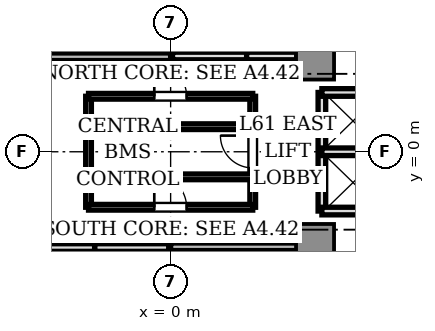
"""IFC4 building model, lengths in metres.
Left out: names, types, materials, properties, quantities, classifications, styles, units other than length and angle.
Written with IfcOpenShell. Run it as: python <this file> out.ifc"""

import sys

from ifc_helpers import new_model, si_unit, direction, frame, frame_2d, origin, origin_2d, place, context, subcontext, project, spatial, rectangle, extrude, source, transform, mapped, element, fill, save


model = new_model("IFC4")
c1 = context("Model", 3, precision=1e-05, world=origin(), true_north=direction((0.0, 1.0)))
c2 = subcontext(c1, "Body", "Model", "MODEL_VIEW")
j1 = project(units=[si_unit("LENGTHUNIT", "METRE"), si_unit("PLANEANGLEUNIT", "RADIAN")], contexts=[c1])
p1 = place(None, origin())
s1 = spatial("IfcSite", under=j1, at=p1, CompositionType="ELEMENT")
p2 = place(p1, origin())
s2 = spatial("IfcBuilding", under=s1, at=p2, CompositionType="ELEMENT")
p3 = place(p2, frame((0.0, 0.0, 219.9)))
s3 = spatial("IfcBuildingStorey", under=s2, at=p3, CompositionType="ELEMENT", Elevation=219.9)
m1 = source(origin(), c2, "Body", "SweptSolid", [
    extrude(rectangle(XDim=1.0, YDim=1.0, at=origin_2d()), origin(), (0.0, 0.0, 1.0), 3.11),
])
for number, where, z_axis, x_axis in (
    (1, (3.8, 2.4, 0.0), (0.0, 0.0, 1.0), (1.0, 0.0, 0.0)),
    (2, (3.8, -2.4, 0.0), (0.0, 0.0, 1.0), (1.0, 0.0, 0.0)),
):
    element("IfcColumn", number, at=place(p3, frame(where, z_axis=z_axis, x_axis=x_axis)), inside=s3, PredefinedType="COLUMN", context=c2, shape_type="MappedRepresentation", body=[
        mapped(m1, transform((0.0, 0.0, 0.0), scale=1.0)),
    ])
p4 = place(p3, frame((0.0, 2.5, 0.0), z_axis=(0.0, 0.0, 1.0), x_axis=(0.0, 1.0, 0.0)))
e3 = element("IfcWall", 3, at=p4, inside=s3, PredefinedType="SOLIDWALL", context=c2, shape_type="SweptSolid", body=[
    extrude(rectangle(XDim=7.68, YDim=0.2, at=frame_2d((3.84, 0.0))), origin(), (0.0, 0.0, 1.0), 3.11),
])
p5 = place(p4, frame((6.36, 0.0, 0.0)))
e4 = element("IfcOpeningElement", 4, at=p5, cuts=e3, PredefinedType="OPENING", context=c2, shape_type="SweptSolid", body=[
    extrude(rectangle(XDim=1.1, YDim=2.15, at=frame_2d((0.55, 1.075))), frame((0.0, 0.11, 0.0), z_axis=(0.0, -1.0, 0.0), x_axis=(1.0, 0.0, 0.0)), (0.0, 0.0, 1.0), 0.22),
])
p6 = place(p3, frame((-3.72, 2.5, 0.0), z_axis=(0.0, 0.0, 1.0), x_axis=(1.0, 0.0, 0.0)))
e5 = element("IfcWall", 5, at=p6, inside=s3, PredefinedType="SOLIDWALL", context=c2, shape_type="SweptSolid", body=[
    extrude(rectangle(XDim=3.72, YDim=0.2, at=frame_2d((1.86, 0.0))), origin(), (0.0, 0.0, 1.0), 3.11),
])
p7 = place(p3, frame((0.0, -10.18, 0.0), z_axis=(0.0, 0.0, 1.0), x_axis=(0.0, 1.0, 0.0)))
e6 = element("IfcWall", 6, at=p7, inside=s3, PredefinedType="SOLIDWALL", context=c2, shape_type="SweptSolid", body=[
    extrude(rectangle(XDim=7.68, YDim=0.2, at=frame_2d((3.84, 0.0))), origin(), (0.0, 0.0, 1.0), 3.11),
])
p8 = place(p7, frame((0.28, 0.0, 0.0)))
e7 = element("IfcOpeningElement", 7, at=p8, cuts=e6, PredefinedType="OPENING", context=c2, shape_type="SweptSolid", body=[
    extrude(rectangle(XDim=1.1, YDim=2.15, at=frame_2d((0.55, 1.075))), frame((0.0, 0.11, 0.0), z_axis=(0.0, -1.0, 0.0), x_axis=(1.0, 0.0, 0.0)), (0.0, 0.0, 1.0), 0.22),
])
p9 = place(p3, frame((0.0, -2.5, 0.0), z_axis=(0.0, 0.0, 1.0), x_axis=(1.0, 0.0, 0.0)))
e8 = element("IfcWall", 8, at=p9, inside=s3, PredefinedType="SOLIDWALL", context=c2, shape_type="SweptSolid", body=[
    extrude(rectangle(XDim=3.72, YDim=0.2, at=frame_2d((1.86, 0.0))), origin(), (0.0, 0.0, 1.0), 3.11),
])
p10 = place(p3, frame((2.0, 2.5, 0.0), z_axis=(0.0, 0.0, 1.0), x_axis=(0.0, 1.0, 0.0)))
e9 = element("IfcWall", 9, at=p10, inside=s3, PredefinedType="SOLIDWALL", context=c2, shape_type="SweptSolid", body=[
    extrude(rectangle(XDim=2.78, YDim=0.2, at=frame_2d((1.39, 0.0))), origin(), (0.0, 0.0, 1.0), 2.66),
])
p11 = place(p3, frame((0.05, 2.52, 0.0), z_axis=(0.0, 0.0, 1.0), x_axis=(1.0, 0.0, 0.0)))
e10 = element("IfcWall", 10, at=p11, inside=s3, PredefinedType="SOLIDWALL", context=c2, shape_type="SweptSolid", body=[
    extrude(rectangle(XDim=1.95, YDim=0.2, at=frame_2d((0.975, 0.0))), origin(), (0.0, 0.0, 1.0), 2.66),
])
p12 = place(p3, frame((-2.0, -5.28, 0.0), z_axis=(0.0, 0.0, 1.0), x_axis=(0.0, 1.0, 0.0)))
e11 = element("IfcWall", 11, at=p12, inside=s3, PredefinedType="SOLIDWALL", context=c2, shape_type="SweptSolid", body=[
    extrude(rectangle(XDim=2.78, YDim=0.2, at=frame_2d((1.39, 0.0))), origin(), (0.0, 0.0, 1.0), 2.66),
])
p13 = place(p3, frame((-2.0, -2.52, 0.0), z_axis=(0.0, 0.0, 1.0), x_axis=(1.0, 0.0, 0.0)))
e12 = element("IfcWall", 12, at=p13, inside=s3, PredefinedType="SOLIDWALL", context=c2, shape_type="SweptSolid", body=[
    extrude(rectangle(XDim=1.95, YDim=0.2, at=frame_2d((0.975, 0.0))), origin(), (0.0, 0.0, 1.0), 2.66),
])
for number, where, z_axis, x_axis in (
    (13, (2.0, 2.52, 0.0), (0.0, 0.0, 1.0), (1.0, 0.0, 0.0)),
    (14, (-3.32, -2.52, 0.0), (0.0, 0.0, 1.0), (1.0, 0.0, 0.0)),
):
    element("IfcWall", number, at=place(p3, frame(where, z_axis=z_axis, x_axis=x_axis)), inside=s3, PredefinedType="SOLIDWALL", context=c2, shape_type="SweptSolid", body=[
        extrude(rectangle(XDim=1.32, YDim=0.2, at=frame_2d((0.66, 0.0))), origin(), (0.0, 0.0, 1.0), 2.66),
    ])
p14 = place(p3, frame((3.98, -1.56, 0.0), z_axis=(0.0, 0.0, 1.0), x_axis=(0.0, 1.0, 0.0)))
e15 = element("IfcWall", 15, at=p14, inside=s3, PredefinedType="SOLIDWALL", context=c2, shape_type="SweptSolid", body=[
    extrude(rectangle(XDim=3.12, YDim=0.2, at=frame_2d((1.56, 0.0))), origin(), (0.0, 0.0, 1.0), 2.33),
])
for number, where, z_axis, x_axis in (
    (16, (3.98, 1.56, 0.0), (0.0, 0.0, 1.0), (1.0, 0.0, 0.0)),
    (17, (3.98, -1.56, 0.0), (0.0, 0.0, 1.0), (1.0, 0.0, 0.0)),
    (18, (3.98, 0.0, 0.0), (0.0, 0.0, 1.0), (1.0, 0.0, 0.0)),
):
    element("IfcWall", number, at=place(p3, frame(where, z_axis=z_axis, x_axis=x_axis)), inside=s3, PredefinedType="SOLIDWALL", context=c2, shape_type="SweptSolid", body=[
        extrude(rectangle(XDim=1.64, YDim=0.2, at=frame_2d((0.82, 0.0))), origin(), (0.0, 0.0, 1.0), 2.66),
    ])
p15 = place(p3, frame((2.16, -1.46, 0.0), z_axis=(0.0, 0.0, 1.0), x_axis=(0.0, 1.0, 0.0)))
e19 = element("IfcWall", 19, at=p15, inside=s3, PredefinedType="PARTITIONING", context=c2, shape_type="SweptSolid", body=[
    extrude(rectangle(XDim=2.92, YDim=0.15, at=frame_2d((1.46, 0.0))), origin(), (0.0, 0.0, 1.0), 2.66),
])
p16 = place(p15, frame((1.035, 0.0, 0.0)))
e20 = element("IfcOpeningElement", 20, at=p16, cuts=e19, PredefinedType="OPENING", context=c2, shape_type="SweptSolid", body=[
    extrude(rectangle(XDim=0.85, YDim=2.1, at=frame_2d((0.425, 1.05))), frame((0.0, 0.085, 0.0), z_axis=(0.0, -1.0, 0.0), x_axis=(1.0, 0.0, 0.0)), (0.0, 0.0, 1.0), 0.17),
])
p17 = place(p3, frame((-2.16, -1.46, 0.0), z_axis=(0.0, 0.0, 1.0), x_axis=(0.0, 1.0, 0.0)))
e21 = element("IfcWall", 21, at=p17, inside=s3, PredefinedType="PARTITIONING", context=c2, shape_type="SweptSolid", body=[
    extrude(rectangle(XDim=2.92, YDim=0.15, at=frame_2d((1.46, 0.0))), origin(), (0.0, 0.0, 1.0), 2.66),
])
p18 = place(p3, frame((-2.16, 1.46, 0.0), z_axis=(0.0, 0.0, 1.0), x_axis=(1.0, 0.0, 0.0)))
e22 = element("IfcWall", 22, at=p18, inside=s3, PredefinedType="PARTITIONING", context=c2, shape_type="SweptSolid", body=[
    extrude(rectangle(XDim=4.32, YDim=0.15, at=frame_2d((2.16, 0.0))), origin(), (0.0, 0.0, 1.0), 2.66),
])
p19 = place(p18, frame((1.73, 0.0, 0.0)))
e23 = element("IfcOpeningElement", 23, at=p19, cuts=e22, PredefinedType="OPENING", context=c2, shape_type="SweptSolid", body=[
    extrude(rectangle(XDim=0.85, YDim=2.1, at=frame_2d((0.425, 1.05))), frame((0.0, 0.085, 0.0), z_axis=(0.0, -1.0, 0.0), x_axis=(1.0, 0.0, 0.0)), (0.0, 0.0, 1.0), 0.17),
])
p20 = place(p3, frame((-2.16, -1.46, 0.0), z_axis=(0.0, 0.0, 1.0), x_axis=(1.0, 0.0, 0.0)))
e24 = element("IfcWall", 24, at=p20, inside=s3, PredefinedType="PARTITIONING", context=c2, shape_type="SweptSolid", body=[
    extrude(rectangle(XDim=4.32, YDim=0.15, at=frame_2d((2.16, 0.0))), origin(), (0.0, 0.0, 1.0), 2.66),
])
p21 = place(p20, frame((1.73, 0.0, 0.0)))
e25 = element("IfcOpeningElement", 25, at=p21, cuts=e24, PredefinedType="OPENING", context=c2, shape_type="SweptSolid", body=[
    extrude(rectangle(XDim=0.85, YDim=2.1, at=frame_2d((0.425, 1.05))), frame((0.0, 0.085, 0.0), z_axis=(0.0, -1.0, 0.0), x_axis=(1.0, 0.0, 0.0)), (0.0, 0.0, 1.0), 0.17),
])
for number, where, z_axis, x_axis in (
    (26, (-2.16, 0.66, 0.0), (0.0, 0.0, 1.0), (1.0, 0.0, 0.0)),
    (27, (-2.16, -0.66, 0.0), (0.0, 0.0, 1.0), (1.0, 0.0, 0.0)),
):
    element("IfcWall", number, at=place(p3, frame(where, z_axis=z_axis, x_axis=x_axis)), inside=s3, PredefinedType="PARTITIONING", context=c2, shape_type="SweptSolid", body=[
        extrude(rectangle(XDim=4.32, YDim=0.15, at=frame_2d((2.16, 0.0))), origin(), (0.0, 0.0, 1.0), 2.66),
    ])
m2 = source(origin(), c2, "Body", "SweptSolid", [
    extrude(rectangle(XDim=0.85, YDim=0.05, at=origin_2d()), origin(), (0.0, 0.0, 1.0), 2.1),
])
p22 = place(p19, frame((0.425, 0.0, 0.0)))
e28 = element("IfcDoor", 28, at=p22, inside=s3, OperationType="SINGLE_SWING_LEFT", PredefinedType="DOOR", context=c2, shape_type="MappedRepresentation", body=[
    mapped(m2, transform((0.0, 0.0, 0.0), scale=1.0)),
])
fill(e23, e28)
p23 = place(p16, frame((0.425, 0.0, 0.0)))
e29 = element("IfcDoor", 29, at=p23, inside=s3, OperationType="SINGLE_SWING_RIGHT", PredefinedType="DOOR", context=c2, shape_type="MappedRepresentation", body=[
    mapped(m2, transform((0.0, 0.0, 0.0), scale=1.0)),
])
fill(e20, e29)
p24 = place(p21, frame((0.425, 0.0, 0.0)))
e30 = element("IfcDoor", 30, at=p24, inside=s3, OperationType="SINGLE_SWING_LEFT", PredefinedType="DOOR", context=c2, shape_type="MappedRepresentation", body=[
    mapped(m2, transform((0.0, 0.0, 0.0), scale=1.0)),
])
fill(e25, e30)
save(model, sys.argv[1])
